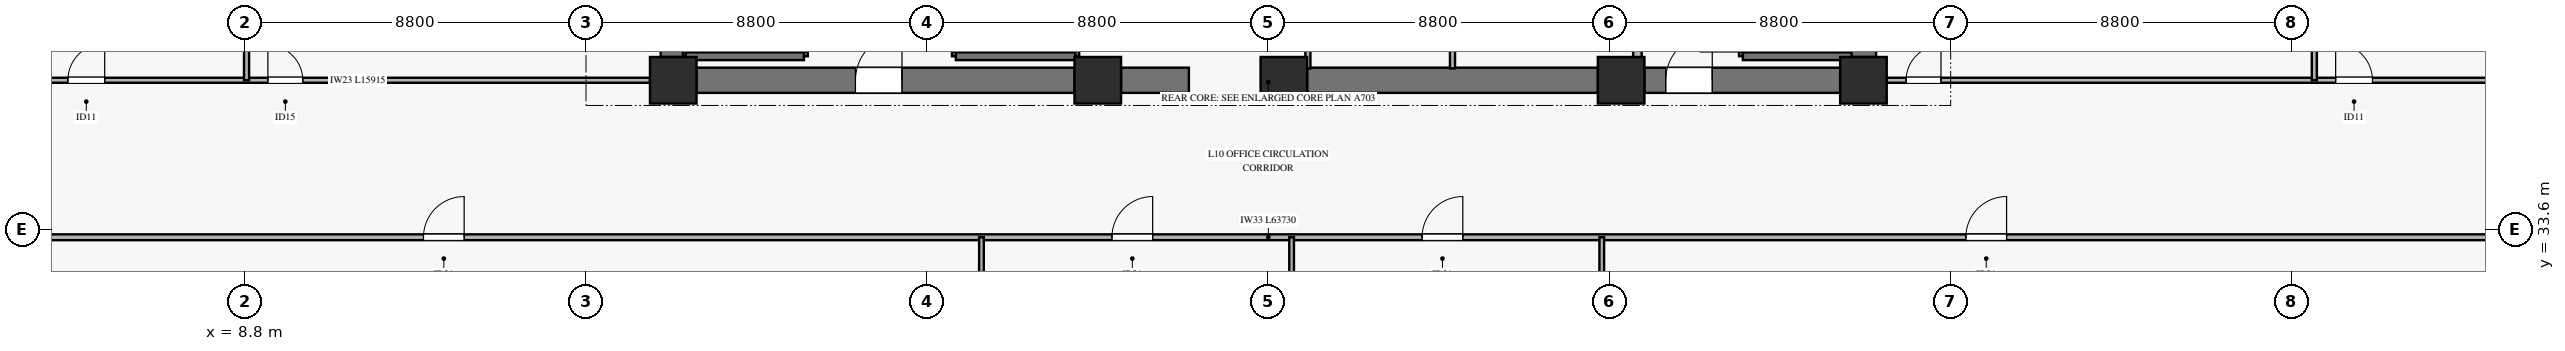
"""IFC4 building model, lengths in metres.
Left out: names, types, materials, properties, quantities, classifications, styles, units other than length and angle.
Written with IfcOpenShell. Run it as: python <this file> out.ifc"""

import sys

from ifc_helpers import new_model, si_unit, direction, frame, frame_2d, origin, origin_2d, place, context, subcontext, project, spatial, rectangle, extrude, source, transform, mapped, element, fill, save


model = new_model("IFC4")
c1 = context("Model", 3, precision=1e-05, world=origin(), true_north=direction((0.0, 1.0)))
c2 = subcontext(c1, "Body", "Model", "MODEL_VIEW")
j1 = project(units=[si_unit("LENGTHUNIT", "METRE"), si_unit("PLANEANGLEUNIT", "RADIAN")], contexts=[c1])
p1 = place(None, origin())
s1 = spatial("IfcSite", under=j1, at=p1, CompositionType="ELEMENT")
p2 = place(p1, origin())
s2 = spatial("IfcBuilding", under=s1, at=p2, CompositionType="ELEMENT")
p3 = place(p2, frame((0.0, 0.0, 41.0)))
s3 = spatial("IfcBuildingStorey", under=s2, at=p3, CompositionType="ELEMENT", Elevation=41.0)
m1 = source(origin(), c2, "Body", "SweptSolid", [
    extrude(rectangle(XDim=1.2, YDim=1.2, at=origin_2d()), origin(), (0.0, 0.0, 1.0), 3.68),
])
for number, where, z_axis, x_axis in (
    (1, (19.85, 37.45, 0.0), (0.0, 0.0, 1.0), (1.0, 0.0, 0.0)),
    (2, (30.8, 37.45, 0.0), (0.0, 0.0, 1.0), (1.0, 0.0, 0.0)),
    (3, (35.6, 37.45, 0.0), (0.0, 0.0, 1.0), (1.0, 0.0, 0.0)),
    (4, (44.3, 37.45, 0.0), (0.0, 0.0, 1.0), (1.0, 0.0, 0.0)),
    (5, (50.55, 37.45, 0.0), (0.0, 0.0, 1.0), (1.0, 0.0, 0.0)),
):
    element("IfcColumn", number, at=place(p3, frame(where, z_axis=z_axis, x_axis=x_axis)), inside=s3, PredefinedType="PILASTER", context=c2, shape_type="MappedRepresentation", body=[
        mapped(m1, transform((0.0, 0.0, 0.0), x_axis=(1.0, 0.0, 0.0), y_axis=(0.0, 1.0, 0.0), z_axis=(0.0, 0.0, 1.0), scale=1.0)),
    ])
p4 = place(p3, frame((20.45, 37.45, 0.0), z_axis=(0.0, 0.0, 1.0), x_axis=(1.0, 0.0, 0.0)))
e6 = element("IfcWall", 6, at=p4, inside=s3, PredefinedType="SHEAR", context=c2, shape_type="SweptSolid", body=[
    extrude(rectangle(XDim=9.75, YDim=0.65, at=frame_2d((4.875, 0.0))), origin(), (0.0, 0.0, 1.0), 3.68),
])
p5 = place(p4, frame((4.1, 0.0, 0.0)))
e7 = element("IfcOpeningElement", 7, at=p5, cuts=e6, PredefinedType="OPENING", context=c2, shape_type="SweptSolid", body=[
    extrude(rectangle(XDim=1.2, YDim=2.15, at=frame_2d((0.6, 1.075))), frame((0.0, 0.335, 0.0), z_axis=(0.0, -1.0, 0.0), x_axis=(1.0, 0.0, 0.0)), (0.0, 0.0, 1.0), 0.67),
])
p6 = place(p3, frame((31.4, 37.45, 0.0), z_axis=(0.0, 0.0, 1.0), x_axis=(1.0, 0.0, 0.0)))
e8 = element("IfcWall", 8, at=p6, inside=s3, PredefinedType="SHEAR", context=c2, shape_type="SweptSolid", body=[
    extrude(rectangle(XDim=1.75, YDim=0.65, at=frame_2d((0.875, 0.0))), origin(), (0.0, 0.0, 1.0), 3.68),
])
p7 = place(p3, frame((36.2, 37.45, 0.0), z_axis=(0.0, 0.0, 1.0), x_axis=(1.0, 0.0, 0.0)))
e9 = element("IfcWall", 9, at=p7, inside=s3, PredefinedType="SHEAR", context=c2, shape_type="SweptSolid", body=[
    extrude(rectangle(XDim=7.5, YDim=0.65, at=frame_2d((3.75, 0.0))), origin(), (0.0, 0.0, 1.0), 3.68),
])
p8 = place(p3, frame((44.9, 37.45, 0.0), z_axis=(0.0, 0.0, 1.0), x_axis=(1.0, 0.0, 0.0)))
e10 = element("IfcWall", 10, at=p8, inside=s3, PredefinedType="SHEAR", context=c2, shape_type="SweptSolid", body=[
    extrude(rectangle(XDim=5.05, YDim=0.65, at=frame_2d((2.525, 0.0))), origin(), (0.0, 0.0, 1.0), 3.68),
])
p9 = place(p8, frame((0.55, 0.0, 0.0)))
e11 = element("IfcOpeningElement", 11, at=p9, cuts=e10, PredefinedType="OPENING", context=c2, shape_type="SweptSolid", body=[
    extrude(rectangle(XDim=1.2, YDim=2.15, at=frame_2d((0.6, 1.075))), frame((0.0, 0.335, 0.0), z_axis=(0.0, -1.0, 0.0), x_axis=(1.0, 0.0, 0.0)), (0.0, 0.0, 1.0), 0.67),
])
for number, where, z_axis, x_axis in (
    (12, (19.85, 38.05, 0.0), (0.0, 0.0, 1.0), (0.0, 1.0, 0.0)),
    (13, (50.55, 38.05, 0.0), (0.0, 0.0, 1.0), (0.0, 1.0, 0.0)),
):
    element("IfcWall", number, at=place(p3, frame(where, z_axis=z_axis, x_axis=x_axis)), inside=s3, PredefinedType="SHEAR", context=c2, shape_type="SweptSolid", body=[
        extrude(rectangle(XDim=7.9, YDim=0.65, at=frame_2d((3.95, 0.0))), origin(), (0.0, 0.0, 1.0), 3.68),
    ])
p10 = place(p3, frame((20.17, 38.07, 0.0), z_axis=(0.0, 0.0, 1.0), x_axis=(0.0, 1.0, 0.0)))
e14 = element("IfcWall", 14, at=p10, inside=s3, PredefinedType="SOLIDWALL", context=c2, shape_type="SweptSolid", body=[
    extrude(rectangle(XDim=7.25, YDim=0.14, at=frame_2d((3.625, 0.0))), origin(), (0.0, 0.0, 1.0), 3.9),
])
p11 = place(p3, frame((23.22, 38.07, 0.0), z_axis=(0.0, 0.0, 1.0), x_axis=(0.0, 1.0, 0.0)))
e15 = element("IfcWall", 15, at=p11, inside=s3, PredefinedType="SOLIDWALL", context=c2, shape_type="SweptSolid", body=[
    extrude(rectangle(XDim=7.25, YDim=0.2, at=frame_2d((3.625, 0.0))), origin(), (0.0, 0.0, 1.0), 3.9),
])
p12 = place(p11, frame((0.11, 0.0, 0.0)))
e16 = element("IfcOpeningElement", 16, at=p12, cuts=e15, PredefinedType="OPENING", context=c2, shape_type="SweptSolid", body=[
    extrude(rectangle(XDim=1.1, YDim=2.15, at=frame_2d((0.55, 1.075))), frame((0.0, 0.11, 0.0), z_axis=(0.0, -1.0, 0.0), x_axis=(1.0, 0.0, 0.0)), (0.0, 0.0, 1.0), 0.22),
])
p13 = place(p3, frame((20.17, 38.07, 0.0), z_axis=(0.0, 0.0, 1.0), x_axis=(1.0, 0.0, 0.0)))
e17 = element("IfcWall", 17, at=p13, inside=s3, PredefinedType="SOLIDWALL", context=c2, shape_type="SweptSolid", body=[
    extrude(rectangle(XDim=3.05, YDim=0.2, at=frame_2d((1.525, 0.0))), origin(), (0.0, 0.0, 1.0), 3.9),
])
p14 = place(p3, frame((27.14, 38.07, 0.0), z_axis=(0.0, 0.0, 1.0), x_axis=(0.0, 1.0, 0.0)))
e18 = element("IfcWall", 18, at=p14, inside=s3, PredefinedType="SOLIDWALL", context=c2, shape_type="SweptSolid", body=[
    extrude(rectangle(XDim=7.25, YDim=0.2, at=frame_2d((3.625, 0.0))), origin(), (0.0, 0.0, 1.0), 3.9),
])
p15 = place(p14, frame((0.11, 0.0, 0.0)))
e19 = element("IfcOpeningElement", 19, at=p15, cuts=e18, PredefinedType="OPENING", context=c2, shape_type="SweptSolid", body=[
    extrude(rectangle(XDim=1.1, YDim=2.15, at=frame_2d((0.55, 1.075))), frame((0.0, 0.11, 0.0), z_axis=(0.0, -1.0, 0.0), x_axis=(1.0, 0.0, 0.0)), (0.0, 0.0, 1.0), 0.22),
])
p16 = place(p3, frame((30.22, 38.07, 0.0), z_axis=(0.0, 0.0, 1.0), x_axis=(0.0, 1.0, 0.0)))
e20 = element("IfcWall", 20, at=p16, inside=s3, PredefinedType="SOLIDWALL", context=c2, shape_type="SweptSolid", body=[
    extrude(rectangle(XDim=7.25, YDim=0.2, at=frame_2d((3.625, 0.0))), origin(), (0.0, 0.0, 1.0), 3.9),
])
p17 = place(p3, frame((27.14, 38.07, 0.0), z_axis=(0.0, 0.0, 1.0), x_axis=(1.0, 0.0, 0.0)))
e21 = element("IfcWall", 21, at=p17, inside=s3, PredefinedType="SOLIDWALL", context=c2, shape_type="SweptSolid", body=[
    extrude(rectangle(XDim=3.08, YDim=0.2, at=frame_2d((1.54, 0.0))), origin(), (0.0, 0.0, 1.0), 3.9),
])
p18 = place(p3, frame((47.44, 38.07, 0.0), z_axis=(0.0, 0.0, 1.0), x_axis=(0.0, 1.0, 0.0)))
e22 = element("IfcWall", 22, at=p18, inside=s3, PredefinedType="SOLIDWALL", context=c2, shape_type="SweptSolid", body=[
    extrude(rectangle(XDim=7.25, YDim=0.2, at=frame_2d((3.625, 0.0))), origin(), (0.0, 0.0, 1.0), 3.9),
])
p19 = place(p18, frame((0.11, 0.0, 0.0)))
e23 = element("IfcOpeningElement", 23, at=p19, cuts=e22, PredefinedType="OPENING", context=c2, shape_type="SweptSolid", body=[
    extrude(rectangle(XDim=1.1, YDim=2.15, at=frame_2d((0.55, 1.075))), frame((0.0, 0.11, 0.0), z_axis=(0.0, -1.0, 0.0), x_axis=(1.0, 0.0, 0.0)), (0.0, 0.0, 1.0), 0.22),
])
p20 = place(p3, frame((47.44, 38.07, 0.0), z_axis=(0.0, 0.0, 1.0), x_axis=(1.0, 0.0, 0.0)))
e24 = element("IfcWall", 24, at=p20, inside=s3, PredefinedType="SOLIDWALL", context=c2, shape_type="SweptSolid", body=[
    extrude(rectangle(XDim=2.805, YDim=0.2, at=frame_2d((1.403, 0.0))), origin(), (0.0, 0.0, 1.0), 3.9),
])
p21 = place(p3, frame((44.72, 37.755, 0.0), z_axis=(0.0, 0.0, 1.0), x_axis=(0.0, 1.0, 0.0)))
e25 = element("IfcWall", 25, at=p21, inside=s3, PredefinedType="SOLIDWALL", context=c2, shape_type="SweptSolid", body=[
    extrude(rectangle(XDim=7.465, YDim=0.22, at=frame_2d((3.732, 0.0))), origin(), (0.0, 0.0, 1.0), 3.68),
])
p22 = place(p3, frame((36.22, 37.755, 0.0), z_axis=(0.0, 0.0, 1.0), x_axis=(0.0, 1.0, 0.0)))
e26 = element("IfcWall", 26, at=p22, inside=s3, PredefinedType="PARTITIONING", context=c2, shape_type="SweptSolid", body=[
    extrude(rectangle(XDim=2.165, YDim=0.13, at=frame_2d((1.083, 0.0))), origin(), (0.0, 0.0, 1.0), 3.68),
])
p23 = place(p22, frame((0.855, 0.0, 0.0)))
e27 = element("IfcOpeningElement", 27, at=p23, cuts=e26, PredefinedType="OPENING", context=c2, shape_type="SweptSolid", body=[
    extrude(rectangle(XDim=0.9, YDim=2.1, at=frame_2d((0.45, 1.05))), frame((0.0, 0.075, 0.0), z_axis=(0.0, -1.0, 0.0), x_axis=(1.0, 0.0, 0.0)), (0.0, 0.0, 1.0), 0.15),
])
p24 = place(p3, frame((39.95, 37.755, 0.0), z_axis=(0.0, 0.0, 1.0), x_axis=(0.0, 1.0, 0.0)))
e28 = element("IfcWall", 28, at=p24, inside=s3, PredefinedType="PARTITIONING", context=c2, shape_type="SweptSolid", body=[
    extrude(rectangle(XDim=2.165, YDim=0.13, at=frame_2d((1.083, 0.0))), origin(), (0.0, 0.0, 1.0), 3.68),
])
p25 = place(p24, frame((0.565, 0.0, 0.0)))
e29 = element("IfcOpeningElement", 29, at=p25, cuts=e28, PredefinedType="OPENING", context=c2, shape_type="SweptSolid", body=[
    extrude(rectangle(XDim=0.9, YDim=2.1, at=frame_2d((0.45, 1.05))), frame((0.0, 0.075, 0.0), z_axis=(0.0, -1.0, 0.0), x_axis=(1.0, 0.0, 0.0)), (0.0, 0.0, 1.0), 0.15),
])
p26 = place(p3, frame((3.335, 33.4, 0.0), z_axis=(0.0, 0.0, 1.0), x_axis=(1.0, 0.0, 0.0)))
e30 = element("IfcWall", 30, at=p26, inside=s3, PredefinedType="PARTITIONING", context=c2, shape_type="SweptSolid", body=[
    extrude(rectangle(XDim=63.73, YDim=0.15, at=frame_2d((31.865, 0.0))), origin(), (0.0, 0.0, 1.0), 2.765),
])
p27 = place(p26, frame((10.072, 0.0, 0.0)))
e31 = element("IfcOpeningElement", 31, at=p27, cuts=e30, PredefinedType="OPENING", context=c2, shape_type="SweptSolid", body=[
    extrude(rectangle(XDim=1.05, YDim=2.15, at=frame_2d((0.525, 1.075))), frame((0.0, 0.085, 0.0), z_axis=(0.0, -1.0, 0.0), x_axis=(1.0, 0.0, 0.0)), (0.0, 0.0, 1.0), 0.17),
])
p28 = place(p26, frame((27.831, 0.0, 0.0)))
e32 = element("IfcOpeningElement", 32, at=p28, cuts=e30, PredefinedType="OPENING", context=c2, shape_type="SweptSolid", body=[
    extrude(rectangle(XDim=1.05, YDim=2.15, at=frame_2d((0.525, 1.075))), frame((0.0, 0.085, 0.0), z_axis=(0.0, -1.0, 0.0), x_axis=(1.0, 0.0, 0.0)), (0.0, 0.0, 1.0), 0.17),
])
p29 = place(p26, frame((35.831, 0.0, 0.0)))
e33 = element("IfcOpeningElement", 33, at=p29, cuts=e30, PredefinedType="OPENING", context=c2, shape_type="SweptSolid", body=[
    extrude(rectangle(XDim=1.05, YDim=2.15, at=frame_2d((0.525, 1.075))), frame((0.0, 0.085, 0.0), z_axis=(0.0, -1.0, 0.0), x_axis=(1.0, 0.0, 0.0)), (0.0, 0.0, 1.0), 0.17),
])
p30 = place(p26, frame((49.857, 0.0, 0.0)))
e34 = element("IfcOpeningElement", 34, at=p30, cuts=e30, PredefinedType="OPENING", context=c2, shape_type="SweptSolid", body=[
    extrude(rectangle(XDim=1.05, YDim=2.15, at=frame_2d((0.525, 1.075))), frame((0.0, 0.085, 0.0), z_axis=(0.0, -1.0, 0.0), x_axis=(1.0, 0.0, 0.0)), (0.0, 0.0, 1.0), 0.17),
])
for number, where, z_axis, x_axis in (
    (35, (27.8, 3.827, 0.0), (0.0, 0.0, 1.0), (0.0, 1.0, 0.0)),
    (36, (35.8, 3.827, 0.0), (0.0, 0.0, 1.0), (0.0, 1.0, 0.0)),
):
    element("IfcWall", number, at=place(p3, frame(where, z_axis=z_axis, x_axis=x_axis)), inside=s3, PredefinedType="PARTITIONING", context=c2, shape_type="SweptSolid", body=[
        extrude(rectangle(XDim=29.573, YDim=0.12, at=frame_2d((14.787, 0.0))), origin(), (0.0, 0.0, 1.0), 3.165),
    ])
p31 = place(p3, frame((43.8, 3.827, 0.0), z_axis=(0.0, 0.0, 1.0), x_axis=(0.0, 1.0, 0.0)))
e37 = element("IfcWall", 37, at=p31, inside=s3, PredefinedType="PARTITIONING", context=c2, shape_type="SweptSolid", body=[
    extrude(rectangle(XDim=29.573, YDim=0.12, at=frame_2d((14.787, 0.0))), origin(), (0.0, 0.0, 1.0), 3.215),
])
p32 = place(p3, frame((3.335, 37.45, 0.0), z_axis=(0.0, 0.0, 1.0), x_axis=(1.0, 0.0, 0.0)))
e38 = element("IfcWall", 38, at=p32, inside=s3, PredefinedType="PARTITIONING", context=c2, shape_type="SweptSolid", body=[
    extrude(rectangle(XDim=15.915, YDim=0.13, at=frame_2d((7.958, 0.0))), origin(), (0.0, 0.0, 1.0), 3.165),
])
p33 = place(p32, frame((0.9, 0.0, 0.0)))
e39 = element("IfcOpeningElement", 39, at=p33, cuts=e38, PredefinedType="OPENING", context=c2, shape_type="SweptSolid", body=[
    extrude(rectangle(XDim=0.95, YDim=2.1, at=frame_2d((0.475, 1.05))), frame((0.0, 0.075, 0.0), z_axis=(0.0, -1.0, 0.0), x_axis=(1.0, 0.0, 0.0)), (0.0, 0.0, 1.0), 0.15),
])
p34 = place(p32, frame((6.059, 0.0, 0.0)))
e40 = element("IfcOpeningElement", 40, at=p34, cuts=e38, PredefinedType="OPENING", context=c2, shape_type="SweptSolid", body=[
    extrude(rectangle(XDim=0.9, YDim=2.1, at=frame_2d((0.45, 1.05))), frame((0.0, 0.075, 0.0), z_axis=(0.0, -1.0, 0.0), x_axis=(1.0, 0.0, 0.0)), (0.0, 0.0, 1.0), 0.15),
])
p35 = place(p3, frame((8.844, 37.45, 0.0), z_axis=(0.0, 0.0, 1.0), x_axis=(0.0, 1.0, 0.0)))
e41 = element("IfcWall", 41, at=p35, inside=s3, PredefinedType="PARTITIONING", context=c2, shape_type="SweptSolid", body=[
    extrude(rectangle(XDim=8.8, YDim=0.13, at=frame_2d((4.4, 0.0))), origin(), (0.0, 0.0, 1.0), 3.68),
])
p36 = place(p3, frame((51.15, 37.45, 0.0), z_axis=(0.0, 0.0, 1.0), x_axis=(1.0, 0.0, 0.0)))
e42 = element("IfcWall", 42, at=p36, inside=s3, PredefinedType="PARTITIONING", context=c2, shape_type="SweptSolid", body=[
    extrude(rectangle(XDim=15.915, YDim=0.13, at=frame_2d((7.958, 0.0))), origin(), (0.0, 0.0, 1.0), 3.165),
])
p37 = place(p36, frame((0.5, 0.0, 0.0)))
e43 = element("IfcOpeningElement", 43, at=p37, cuts=e42, PredefinedType="OPENING", context=c2, shape_type="SweptSolid", body=[
    extrude(rectangle(XDim=0.9, YDim=2.1, at=frame_2d((0.45, 1.05))), frame((0.0, 0.075, 0.0), z_axis=(0.0, -1.0, 0.0), x_axis=(1.0, 0.0, 0.0)), (0.0, 0.0, 1.0), 0.15),
])
p38 = place(p36, frame((11.58, 0.0, 0.0)))
e44 = element("IfcOpeningElement", 44, at=p38, cuts=e42, PredefinedType="OPENING", context=c2, shape_type="SweptSolid", body=[
    extrude(rectangle(XDim=0.95, YDim=2.1, at=frame_2d((0.475, 1.05))), frame((0.0, 0.075, 0.0), z_axis=(0.0, -1.0, 0.0), x_axis=(1.0, 0.0, 0.0)), (0.0, 0.0, 1.0), 0.15),
])
p39 = place(p3, frame((62.18, 37.45, 0.0), z_axis=(0.0, 0.0, 1.0), x_axis=(0.0, 1.0, 0.0)))
e45 = element("IfcWall", 45, at=p39, inside=s3, PredefinedType="PARTITIONING", context=c2, shape_type="SweptSolid", body=[
    extrude(rectangle(XDim=8.8, YDim=0.13, at=frame_2d((4.4, 0.0))), origin(), (0.0, 0.0, 1.0), 3.68),
])
m2 = source(origin(), c2, "Body", "SweptSolid", [
    extrude(rectangle(XDim=1.2, YDim=2.15, at=frame_2d((0.6, 1.075))), frame((0.0, 0.025, 0.0), z_axis=(0.0, -1.0, 0.0), x_axis=(1.0, 0.0, 0.0)), (0.0, 0.0, 1.0), 0.05),
])
p40 = place(p5, origin())
e46 = element("IfcDoor", 46, at=p40, inside=s3, OperationType="SINGLE_SWING_RIGHT", PredefinedType="DOOR", context=c2, shape_type="MappedRepresentation", body=[
    mapped(m2, transform((0.0, 0.0, 0.0), x_axis=(1.0, 0.0, 0.0), y_axis=(0.0, 1.0, 0.0), z_axis=(0.0, 0.0, 1.0), scale=1.0)),
])
fill(e7, e46)
p41 = place(p9, origin())
e47 = element("IfcDoor", 47, at=p41, inside=s3, OperationType="SINGLE_SWING_RIGHT", PredefinedType="DOOR", context=c2, shape_type="MappedRepresentation", body=[
    mapped(m2, transform((0.0, 0.0, 0.0), x_axis=(1.0, 0.0, 0.0), y_axis=(0.0, 1.0, 0.0), z_axis=(0.0, 0.0, 1.0), scale=1.0)),
])
fill(e11, e47)
m3 = source(origin(), c2, "Body", "SweptSolid", [
    extrude(rectangle(XDim=1.05, YDim=2.15, at=frame_2d((0.525, 1.075))), frame((0.0, 0.025, 0.0), z_axis=(0.0, -1.0, 0.0), x_axis=(1.0, 0.0, 0.0)), (0.0, 0.0, 1.0), 0.05),
])
p42 = place(p27, origin())
e48 = element("IfcDoor", 48, at=p42, inside=s3, OperationType="SINGLE_SWING_RIGHT", PredefinedType="DOOR", context=c2, shape_type="MappedRepresentation", body=[
    mapped(m3, transform((0.0, 0.0, 0.0), x_axis=(1.0, 0.0, 0.0), y_axis=(0.0, 1.0, 0.0), z_axis=(0.0, 0.0, 1.0), scale=1.0)),
])
fill(e31, e48)
p43 = place(p28, origin())
e49 = element("IfcDoor", 49, at=p43, inside=s3, OperationType="SINGLE_SWING_RIGHT", PredefinedType="DOOR", context=c2, shape_type="MappedRepresentation", body=[
    mapped(m3, transform((0.0, 0.0, 0.0), x_axis=(1.0, 0.0, 0.0), y_axis=(0.0, 1.0, 0.0), z_axis=(0.0, 0.0, 1.0), scale=1.0)),
])
fill(e32, e49)
p44 = place(p29, origin())
e50 = element("IfcDoor", 50, at=p44, inside=s3, OperationType="SINGLE_SWING_RIGHT", PredefinedType="DOOR", context=c2, shape_type="MappedRepresentation", body=[
    mapped(m3, transform((0.0, 0.0, 0.0), x_axis=(1.0, 0.0, 0.0), y_axis=(0.0, 1.0, 0.0), z_axis=(0.0, 0.0, 1.0), scale=1.0)),
])
fill(e33, e50)
p45 = place(p30, origin())
e51 = element("IfcDoor", 51, at=p45, inside=s3, OperationType="SINGLE_SWING_RIGHT", PredefinedType="DOOR", context=c2, shape_type="MappedRepresentation", body=[
    mapped(m3, transform((0.0, 0.0, 0.0), x_axis=(1.0, 0.0, 0.0), y_axis=(0.0, 1.0, 0.0), z_axis=(0.0, 0.0, 1.0), scale=1.0)),
])
fill(e34, e51)
m4 = source(origin(), c2, "Body", "SweptSolid", [
    extrude(rectangle(XDim=0.95, YDim=2.1, at=frame_2d((0.475, 1.05))), frame((0.0, 0.025, 0.0), z_axis=(0.0, -1.0, 0.0), x_axis=(1.0, 0.0, 0.0)), (0.0, 0.0, 1.0), 0.05),
])
p46 = place(p33, origin())
e52 = element("IfcDoor", 52, at=p46, inside=s3, OperationType="SINGLE_SWING_RIGHT", PredefinedType="DOOR", context=c2, shape_type="MappedRepresentation", body=[
    mapped(m4, transform((0.0, 0.0, 0.0), x_axis=(1.0, 0.0, 0.0), y_axis=(0.0, 1.0, 0.0), z_axis=(0.0, 0.0, 1.0), scale=1.0)),
])
fill(e39, e52)
m5 = source(origin(), c2, "Body", "SweptSolid", [
    extrude(rectangle(XDim=0.9, YDim=2.1, at=frame_2d((0.45, 1.05))), frame((0.0, 0.025, 0.0), z_axis=(0.0, -1.0, 0.0), x_axis=(1.0, 0.0, 0.0)), (0.0, 0.0, 1.0), 0.05),
])
p47 = place(p34, origin())
e53 = element("IfcDoor", 53, at=p47, inside=s3, OperationType="SINGLE_SWING_LEFT", PredefinedType="DOOR", context=c2, shape_type="MappedRepresentation", body=[
    mapped(m5, transform((0.0, 0.0, 0.0), x_axis=(1.0, 0.0, 0.0), y_axis=(0.0, 1.0, 0.0), z_axis=(0.0, 0.0, 1.0), scale=1.0)),
])
fill(e40, e53)
p48 = place(p37, origin())
e54 = element("IfcDoor", 54, at=p48, inside=s3, OperationType="SINGLE_SWING_RIGHT", PredefinedType="DOOR", context=c2, shape_type="MappedRepresentation", body=[
    mapped(m5, transform((0.0, 0.0, 0.0), x_axis=(1.0, 0.0, 0.0), y_axis=(0.0, 1.0, 0.0), z_axis=(0.0, 0.0, 1.0), scale=1.0)),
])
fill(e43, e54)
p49 = place(p38, origin())
e55 = element("IfcDoor", 55, at=p49, inside=s3, OperationType="SINGLE_SWING_LEFT", PredefinedType="DOOR", context=c2, shape_type="MappedRepresentation", body=[
    mapped(m4, transform((0.0, 0.0, 0.0), x_axis=(1.0, 0.0, 0.0), y_axis=(0.0, 1.0, 0.0), z_axis=(0.0, 0.0, 1.0), scale=1.0)),
])
fill(e44, e55)
save(model, sys.argv[1])
